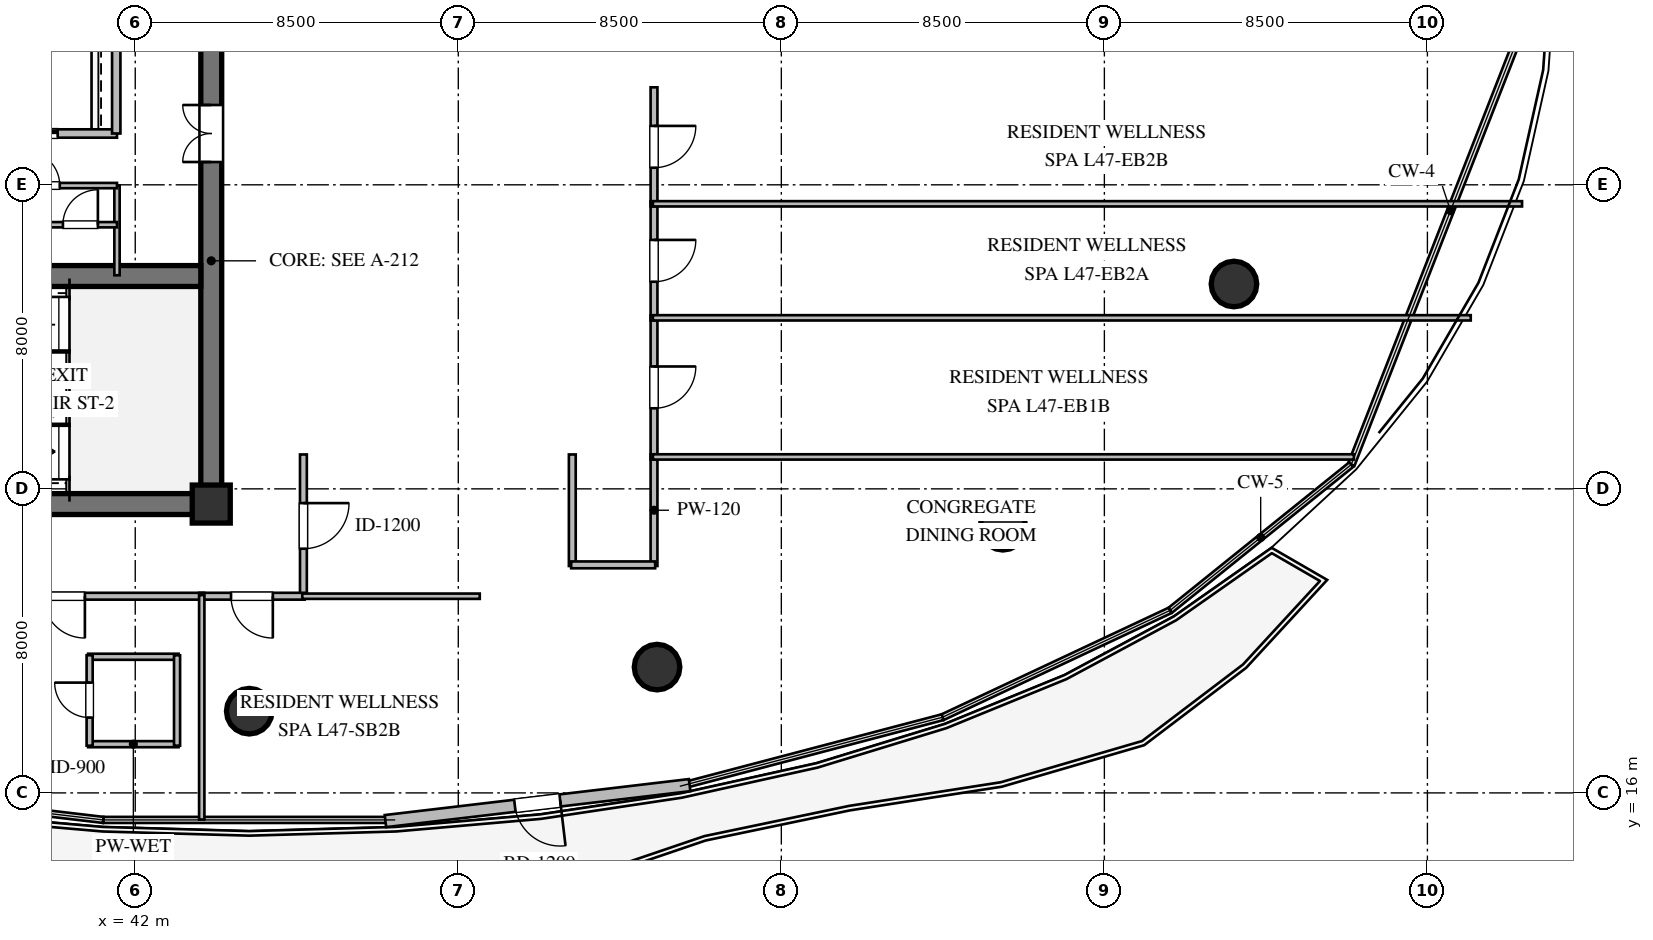
"""IFC4 building model, lengths in metres.
Left out: names, types, materials, properties, quantities, classifications, styles, units other than length and angle.
Written with IfcOpenShell. Run it as: python <this file> out.ifc"""

import sys

from ifc_helpers import new_model, si_unit, direction, frame, frame_2d, origin, origin_2d, place, context, subcontext, project, spatial, rectangle, circle, extrude, element, fill, save


model = new_model("IFC4")
c1 = context("Model", 3, precision=1e-05, world=origin(), true_north=direction((0.0, 1.0)))
c2 = subcontext(c1, "Body", "Model", "MODEL_VIEW")
j1 = project(units=[si_unit("LENGTHUNIT", "METRE"), si_unit("PLANEANGLEUNIT", "RADIAN")], contexts=[c1])
p1 = place(None, origin())
s1 = spatial("IfcSite", under=j1, at=p1, CompositionType="ELEMENT")
p2 = place(p1, origin())
s2 = spatial("IfcBuilding", under=s1, at=p2, CompositionType="ELEMENT")
p3 = place(p2, frame((0.0, 0.0, 178.2)))
s3 = spatial("IfcBuildingStorey", under=s2, at=p3, CompositionType="ELEMENT", Elevation=178.2)
p4 = place(p3, frame((21.725, 23.6, 0.0), z_axis=(0.0, 0.0, 1.0), x_axis=(1.0, 0.0, 0.0)))
e1 = element("IfcWall", 1, at=p4, inside=s3, PredefinedType="SHEAR", context=c2, shape_type="SweptSolid", body=[
    extrude(rectangle(XDim=22.55, YDim=0.55, at=frame_2d((11.275, 0.0))), origin(), (0.0, 0.0, 1.0), 3.28),
])
p5 = place(p3, frame((44.0, 23.875, 0.0), z_axis=(0.0, 0.0, 1.0), x_axis=(0.0, 1.0, 0.0)))
e2 = element("IfcWall", 2, at=p5, inside=s3, PredefinedType="SHEAR", context=c2, shape_type="SweptSolid", body=[
    extrude(rectangle(XDim=12.25, YDim=0.55, at=frame_2d((6.125, 0.0))), origin(), (0.0, 0.0, 1.0), 3.28),
])
p6 = place(p5, frame((8.725, 0.0, 0.0)))
e3 = element("IfcOpeningElement", 3, at=p6, cuts=e2, PredefinedType="OPENING", context=c2, shape_type="SweptSolid", body=[
    extrude(rectangle(XDim=1.5, YDim=2.15, at=frame_2d((0.75, 1.075))), frame((0.0, 0.285, 0.0), z_axis=(0.0, -1.0, 0.0), x_axis=(1.0, 0.0, 0.0)), (0.0, 0.0, 1.0), 0.57),
])
p7 = place(p3, frame((22.275, 29.6, 0.0), z_axis=(0.0, 0.0, 1.0), x_axis=(1.0, 0.0, 0.0)))
e4 = element("IfcWall", 4, at=p7, inside=s3, PredefinedType="SHEAR", context=c2, shape_type="SweptSolid", body=[
    extrude(rectangle(XDim=21.45, YDim=0.55, at=frame_2d((10.725, 0.0))), origin(), (0.0, 0.0, 1.0), 3.28),
])
p8 = place(p7, frame((12.175, 0.0, 0.0)))
e5 = element("IfcOpeningElement", 5, at=p8, cuts=e4, PredefinedType="OPENING", context=c2, shape_type="SweptSolid", body=[
    extrude(rectangle(XDim=1.15, YDim=2.1, at=frame_2d((0.575, 1.05))), frame((0.0, 0.285, 0.0), z_axis=(0.0, -1.0, 0.0), x_axis=(1.0, 0.0, 0.0)), (0.0, 0.0, 1.0), 0.57),
])
p9 = place(p3, frame((44.0, 23.6, 0.0), z_axis=(0.0, 0.0, 1.0), x_axis=(1.0, 0.0, 0.0)))
e6 = element("IfcColumn", 6, at=p9, inside=s3, PredefinedType="COLUMN", context=c2, shape_type="SweptSolid", body=[
    extrude(rectangle(XDim=1.0, YDim=1.0, at=origin_2d()), origin(), (0.0, 0.0, 1.0), 3.6),
])
for number, where, z_axis, x_axis in (
    (7, (45.0, 18.15, 0.0), (0.0, 0.0, 1.0), (1.0, 0.0, 0.0)),
    (8, (55.73, 19.31, 0.0), (0.0, 0.0, 1.0), (1.0, 0.0, 0.0)),
    (9, (64.83, 22.99, 0.0), (0.0, 0.0, 1.0), (1.0, 0.0, 0.0)),
    (10, (70.91, 29.39, 0.0), (0.0, 0.0, 1.0), (1.0, 0.0, 0.0)),
):
    element("IfcColumn", number, at=place(p3, frame(where, z_axis=z_axis, x_axis=x_axis)), inside=s3, PredefinedType="COLUMN", context=c2, shape_type="SweptSolid", body=[
        extrude(circle(Radius=0.6, at=origin_2d()), origin(), (0.0, 0.0, 1.0), 3.6),
    ])
p10 = place(p3, frame((56.587, 16.205, 0.0), z_axis=(0.0, 0.0, 1.0), x_axis=(-0.993072847957, -0.117500292131, 0.0)))
e11 = element("IfcWall", 11, at=p10, inside=s3, PredefinedType="STANDARD", context=c2, shape_type="SweptSolid", body=[
    extrude(rectangle(XDim=8.06, YDim=0.32, at=frame_2d((4.03, 0.0))), origin(), (0.0, 0.0, 1.0), 3.28),
])
p11 = place(p10, frame((3.43, 0.0, 0.0)))
e12 = element("IfcOpeningElement", 12, at=p11, cuts=e11, PredefinedType="OPENING", context=c2, shape_type="SweptSolid", body=[
    extrude(rectangle(XDim=1.2, YDim=2.15, at=frame_2d((0.6, 1.075))), frame((0.0, 0.17, 0.0), z_axis=(0.0, -1.0, 0.0), x_axis=(1.0, 0.0, 0.0)), (0.0, 0.0, 1.0), 0.34),
])
p12 = place(p3, frame((33.98, 33.35, 0.0), z_axis=(0.0, 0.0, 1.0), x_axis=(1.0, 0.0, 0.0)))
e13 = element("IfcWall", 13, at=p12, inside=s3, PredefinedType="SOLIDWALL", context=c2, shape_type="SweptSolid", body=[
    extrude(rectangle(XDim=7.54, YDim=0.22, at=frame_2d((3.77, 0.0))), origin(), (0.0, 0.0, 1.0), 3.28),
])
p13 = place(p12, frame((1.335, 0.0, 0.0)))
e14 = element("IfcOpeningElement", 14, at=p13, cuts=e13, PredefinedType="OPENING", context=c2, shape_type="SweptSolid", body=[
    extrude(rectangle(XDim=1.1, YDim=2.1, at=frame_2d((0.55, 1.05))), frame((0.0, 0.12, 0.0), z_axis=(0.0, -1.0, 0.0), x_axis=(1.0, 0.0, 0.0)), (0.0, 0.0, 1.0), 0.24),
])
p14 = place(p12, frame((4.879, 0.0, 0.0)))
e15 = element("IfcOpeningElement", 15, at=p14, cuts=e13, PredefinedType="OPENING", context=c2, shape_type="SweptSolid", body=[
    extrude(rectangle(XDim=1.1, YDim=2.1, at=frame_2d((0.55, 1.05))), frame((0.0, 0.12, 0.0), z_axis=(0.0, -1.0, 0.0), x_axis=(1.0, 0.0, 0.0)), (0.0, 0.0, 1.0), 0.24),
])
p15 = place(p3, frame((41.5, 33.35, 0.0), z_axis=(0.0, 0.0, 1.0), x_axis=(0.0, 1.0, 0.0)))
e16 = element("IfcWall", 16, at=p15, inside=s3, PredefinedType="SOLIDWALL", context=c2, shape_type="SweptSolid", body=[
    extrude(rectangle(XDim=2.75, YDim=0.22, at=frame_2d((1.375, 0.0))), origin(), (0.0, 0.0, 1.0), 3.28),
])
p16 = place(p3, frame((41.52, 29.62, 0.0), z_axis=(0.0, 0.0, 1.0), x_axis=(0.0, 1.0, 0.0)))
e17 = element("IfcWall", 17, at=p16, inside=s3, PredefinedType="PARTITIONING", context=c2, shape_type="SweptSolid", body=[
    extrude(rectangle(XDim=2.36, YDim=0.14, at=frame_2d((1.18, 0.0))), origin(), (0.0, 0.0, 1.0), 3.28),
])
p17 = place(p3, frame((38.48, 30.95, 0.0), z_axis=(0.0, 0.0, 1.0), x_axis=(1.0, 0.0, 0.0)))
e18 = element("IfcWall", 18, at=p17, inside=s3, PredefinedType="PARTITIONING", context=c2, shape_type="SweptSolid", body=[
    extrude(rectangle(XDim=3.04, YDim=0.14, at=frame_2d((1.52, 0.0))), origin(), (0.0, 0.0, 1.0), 3.28),
])
p18 = place(p17, frame((1.617, 0.0, 0.0)))
e19 = element("IfcOpeningElement", 19, at=p18, cuts=e18, PredefinedType="OPENING", context=c2, shape_type="SweptSolid", body=[
    extrude(rectangle(XDim=0.92, YDim=2.1, at=frame_2d((0.46, 1.05))), frame((0.0, 0.08, 0.0), z_axis=(0.0, -1.0, 0.0), x_axis=(1.0, 0.0, 0.0)), (0.0, 0.0, 1.0), 0.16),
])
p19 = place(p3, frame((38.48, 31.98, 0.0), z_axis=(0.0, 0.0, 1.0), x_axis=(1.0, 0.0, 0.0)))
e20 = element("IfcWall", 20, at=p19, inside=s3, PredefinedType="PARTITIONING", context=c2, shape_type="SweptSolid", body=[
    extrude(rectangle(XDim=3.04, YDim=0.14, at=frame_2d((1.52, 0.0))), origin(), (0.0, 0.0, 1.0), 3.28),
])
p20 = place(p19, frame((0.614, 0.0, 0.0)))
e21 = element("IfcOpeningElement", 21, at=p20, cuts=e20, PredefinedType="OPENING", context=c2, shape_type="SweptSolid", body=[
    extrude(rectangle(XDim=0.92, YDim=2.1, at=frame_2d((0.46, 1.05))), frame((0.0, 0.08, 0.0), z_axis=(0.0, -1.0, 0.0), x_axis=(1.0, 0.0, 0.0)), (0.0, 0.0, 1.0), 0.16),
])
for number, where, z_axis, x_axis in (
    (22, (40.76, 17.282, 0.0), (0.0, 0.0, 1.0), (1.0, 0.0, 0.0)),
    (23, (40.76, 19.582, 0.0), (0.0, 0.0, 1.0), (1.0, 0.0, 0.0)),
):
    element("IfcWall", number, at=place(p3, frame(where, z_axis=z_axis, x_axis=x_axis)), inside=s3, PredefinedType="PLUMBINGWALL", context=c2, shape_type="SweptSolid", body=[
        extrude(rectangle(XDim=2.38, YDim=0.16, at=frame_2d((1.19, 0.0))), origin(), (0.0, 0.0, 1.0), 3.28),
    ])
p21 = place(p3, frame((40.8, 17.242, 0.0), z_axis=(0.0, 0.0, 1.0), x_axis=(0.0, 1.0, 0.0)))
e24 = element("IfcWall", 24, at=p21, inside=s3, PredefinedType="PLUMBINGWALL", context=c2, shape_type="SweptSolid", body=[
    extrude(rectangle(XDim=2.38, YDim=0.16, at=frame_2d((1.19, 0.0))), origin(), (0.0, 0.0, 1.0), 3.28),
])
p22 = place(p21, frame((0.74, 0.0, 0.0)))
e25 = element("IfcOpeningElement", 25, at=p22, cuts=e24, PredefinedType="OPENING", context=c2, shape_type="SweptSolid", body=[
    extrude(rectangle(XDim=0.92, YDim=2.1, at=frame_2d((0.46, 1.05))), frame((0.0, 0.09, 0.0), z_axis=(0.0, -1.0, 0.0), x_axis=(1.0, 0.0, 0.0)), (0.0, 0.0, 1.0), 0.18),
])
p23 = place(p3, frame((43.1, 17.242, 0.0), z_axis=(0.0, 0.0, 1.0), x_axis=(0.0, 1.0, 0.0)))
e26 = element("IfcWall", 26, at=p23, inside=s3, PredefinedType="PLUMBINGWALL", context=c2, shape_type="SweptSolid", body=[
    extrude(rectangle(XDim=2.38, YDim=0.16, at=frame_2d((1.19, 0.0))), origin(), (0.0, 0.0, 1.0), 3.28),
])
p24 = place(p3, frame((46.425, 24.905, 0.0), z_axis=(0.0, 0.0, 1.0), x_axis=(0.0, -1.0, 0.0)))
e27 = element("IfcWall", 27, at=p24, inside=s3, PredefinedType="PARTITIONING", context=c2, shape_type="SweptSolid", body=[
    extrude(rectangle(XDim=3.76, YDim=0.18, at=frame_2d((1.88, 0.0))), origin(), (0.0, 0.0, 1.0), 3.28),
])
p25 = place(p24, frame((1.28, 0.0, 0.0)))
e28 = element("IfcOpeningElement", 28, at=p25, cuts=e27, PredefinedType="OPENING", context=c2, shape_type="SweptSolid", body=[
    extrude(rectangle(XDim=1.2, YDim=2.15, at=frame_2d((0.6, 1.075))), frame((0.0, 0.1, 0.0), z_axis=(0.0, -1.0, 0.0), x_axis=(1.0, 0.0, 0.0)), (0.0, 0.0, 1.0), 0.2),
])
for number, where, z_axis, x_axis in (
    (29, (55.65, 24.905, 0.0), (0.0, 0.0, 1.0), (0.0, -1.0, 0.0)),
    (30, (53.5, 21.97, 0.0), (0.0, 0.0, 1.0), (0.0, 1.0, 0.0)),
):
    element("IfcWall", number, at=place(p3, frame(where, z_axis=z_axis, x_axis=x_axis)), inside=s3, PredefinedType="PARTITIONING", context=c2, shape_type="SweptSolid", body=[
        extrude(rectangle(XDim=2.935, YDim=0.18, at=frame_2d((1.468, 0.0))), origin(), (0.0, 0.0, 1.0), 3.28),
    ])
p26 = place(p3, frame((55.68, 22.0, 0.0), z_axis=(0.0, 0.0, 1.0), x_axis=(-1.0, 0.0, 0.0)))
e31 = element("IfcWall", 31, at=p26, inside=s3, PredefinedType="PARTITIONING", context=c2, shape_type="SweptSolid", body=[
    extrude(rectangle(XDim=2.21, YDim=0.18, at=frame_2d((1.105, 0.0))), origin(), (0.0, 0.0, 1.0), 3.28),
])
p27 = place(p3, frame((55.65, 28.565, 0.0), z_axis=(0.0, 0.0, 1.0), x_axis=(0.0, -1.0, 0.0)))
e32 = element("IfcWall", 32, at=p27, inside=s3, PredefinedType="PARTITIONING", context=c2, shape_type="SweptSolid", body=[
    extrude(rectangle(XDim=3.79, YDim=0.18, at=frame_2d((1.895, 0.0))), origin(), (0.0, 0.0, 1.0), 3.28),
])
p28 = place(p27, frame((1.345, 0.0, 0.0)))
e33 = element("IfcOpeningElement", 33, at=p28, cuts=e32, PredefinedType="OPENING", context=c2, shape_type="SweptSolid", body=[
    extrude(rectangle(XDim=1.1, YDim=2.1, at=frame_2d((0.55, 1.05))), frame((0.0, 0.1, 0.0), z_axis=(0.0, -1.0, 0.0), x_axis=(1.0, 0.0, 0.0)), (0.0, 0.0, 1.0), 0.2),
])
p29 = place(p3, frame((55.65, 31.565, 0.0), z_axis=(0.0, 0.0, 1.0), x_axis=(0.0, -1.0, 0.0)))
e34 = element("IfcWall", 34, at=p29, inside=s3, PredefinedType="PARTITIONING", context=c2, shape_type="SweptSolid", body=[
    extrude(rectangle(XDim=3.13, YDim=0.18, at=frame_2d((1.565, 0.0))), origin(), (0.0, 0.0, 1.0), 3.28),
])
p30 = place(p29, frame((1.015, 0.0, 0.0)))
e35 = element("IfcOpeningElement", 35, at=p30, cuts=e34, PredefinedType="OPENING", context=c2, shape_type="SweptSolid", body=[
    extrude(rectangle(XDim=1.1, YDim=2.1, at=frame_2d((0.55, 1.05))), frame((0.0, 0.1, 0.0), z_axis=(0.0, -1.0, 0.0), x_axis=(1.0, 0.0, 0.0)), (0.0, 0.0, 1.0), 0.2),
])
p31 = place(p3, frame((55.65, 34.565, 0.0), z_axis=(0.0, 0.0, 1.0), x_axis=(0.0, -1.0, 0.0)))
e36 = element("IfcWall", 36, at=p31, inside=s3, PredefinedType="PARTITIONING", context=c2, shape_type="SweptSolid", body=[
    extrude(rectangle(XDim=3.13, YDim=0.18, at=frame_2d((1.565, 0.0))), origin(), (0.0, 0.0, 1.0), 3.28),
])
p32 = place(p31, frame((1.015, 0.0, 0.0)))
e37 = element("IfcOpeningElement", 37, at=p32, cuts=e36, PredefinedType="OPENING", context=c2, shape_type="SweptSolid", body=[
    extrude(rectangle(XDim=1.1, YDim=2.1, at=frame_2d((0.55, 1.05))), frame((0.0, 0.1, 0.0), z_axis=(0.0, -1.0, 0.0), x_axis=(1.0, 0.0, 0.0)), (0.0, 0.0, 1.0), 0.2),
])
p33 = place(p3, frame((43.815, 21.175, 0.0), z_axis=(0.0, 0.0, 1.0), x_axis=(-1.0, 0.0, 0.0)))
e38 = element("IfcWall", 38, at=p33, inside=s3, PredefinedType="PARTITIONING", context=c2, shape_type="SweptSolid", body=[
    extrude(rectangle(XDim=7.38, YDim=0.18, at=frame_2d((3.69, 0.0))), origin(), (0.0, 0.0, 1.0), 2.916),
])
p34 = place(p33, frame((3.14, 0.0, 0.0)))
e39 = element("IfcOpeningElement", 39, at=p34, cuts=e38, PredefinedType="OPENING", context=c2, shape_type="SweptSolid", body=[
    extrude(rectangle(XDim=1.1, YDim=2.1, at=frame_2d((0.55, 1.05))), frame((0.0, 0.1, 0.0), z_axis=(0.0, -1.0, 0.0), x_axis=(1.0, 0.0, 0.0)), (0.0, 0.0, 1.0), 0.2),
])
p35 = place(p3, frame((46.455, 21.175, 0.0), z_axis=(0.0, 0.0, 1.0), x_axis=(-1.0, 0.0, 0.0)))
e40 = element("IfcWall", 40, at=p35, inside=s3, PredefinedType="PARTITIONING", context=c2, shape_type="SweptSolid", body=[
    extrude(rectangle(XDim=2.77, YDim=0.18, at=frame_2d((1.385, 0.0))), origin(), (0.0, 0.0, 1.0), 2.916),
])
p36 = place(p35, frame((0.835, 0.0, 0.0)))
e41 = element("IfcOpeningElement", 41, at=p36, cuts=e40, PredefinedType="OPENING", context=c2, shape_type="SweptSolid", body=[
    extrude(rectangle(XDim=1.1, YDim=2.1, at=frame_2d((0.55, 1.05))), frame((0.0, 0.1, 0.0), z_axis=(0.0, -1.0, 0.0), x_axis=(1.0, 0.0, 0.0)), (0.0, 0.0, 1.0), 0.2),
])
p37 = place(p3, frame((55.62, 24.84, 0.0), z_axis=(0.0, 0.0, 1.0), x_axis=(1.0, 0.0, 0.0)))
e42 = element("IfcWall", 42, at=p37, inside=s3, PredefinedType="PARTITIONING", context=c2, shape_type="SweptSolid", body=[
    extrude(rectangle(XDim=18.445, YDim=0.14, at=frame_2d((9.222, 0.0))), origin(), (0.0, 0.0, 1.0), 3.28),
])
p38 = place(p3, frame((51.065, 21.175, 0.0), z_axis=(0.0, 0.0, 1.0), x_axis=(-1.0, 0.0, 0.0)))
e43 = element("IfcWall", 43, at=p38, inside=s3, PredefinedType="PARTITIONING", context=c2, shape_type="SweptSolid", body=[
    extrude(rectangle(XDim=4.67, YDim=0.14, at=frame_2d((2.335, 0.0))), origin(), (0.0, 0.0, 1.0), 2.916),
])
p39 = place(p3, frame((55.62, 28.5, 0.0), z_axis=(0.0, 0.0, 1.0), x_axis=(1.0, 0.0, 0.0)))
e44 = element("IfcWall", 44, at=p39, inside=s3, PredefinedType="PARTITIONING", context=c2, shape_type="SweptSolid", body=[
    extrude(rectangle(XDim=21.52, YDim=0.14, at=frame_2d((10.76, 0.0))), origin(), (0.0, 0.0, 1.0), 2.81),
])
p40 = place(p3, frame((55.62, 31.5, 0.0), z_axis=(0.0, 0.0, 1.0), x_axis=(1.0, 0.0, 0.0)))
e45 = element("IfcWall", 45, at=p40, inside=s3, PredefinedType="PARTITIONING", context=c2, shape_type="SweptSolid", body=[
    extrude(rectangle(XDim=22.87, YDim=0.14, at=frame_2d((11.435, 0.0))), origin(), (0.0, 0.0, 1.0), 3.28),
])
p41 = place(p3, frame((43.75, 21.205, 0.0), z_axis=(0.0, 0.0, 1.0), x_axis=(0.0, -1.0, 0.0)))
e46 = element("IfcWall", 46, at=p41, inside=s3, PredefinedType="PARTITIONING", context=c2, shape_type="SweptSolid", body=[
    extrude(rectangle(XDim=5.906, YDim=0.14, at=frame_2d((2.953, 0.0))), origin(), (0.0, 0.0, 1.0), 3.28),
])
p42 = place(p11, origin())
e47 = element("IfcDoor", 47, at=p42, inside=s3, OperationType="SINGLE_SWING_LEFT", PredefinedType="DOOR", context=c2, shape_type="SweptSolid", body=[
    extrude(rectangle(XDim=1.2, YDim=2.15, at=frame_2d((0.6, 1.075))), frame((0.0, 0.025, 0.0), z_axis=(0.0, -1.0, 0.0), x_axis=(1.0, 0.0, 0.0)), (0.0, 0.0, 1.0), 0.05),
])
fill(e12, e47)
p43 = place(p6, origin())
e48 = element("IfcDoor", 48, at=p43, inside=s3, OperationType="DOUBLE_DOOR_SINGLE_SWING", PredefinedType="DOOR", context=c2, shape_type="SweptSolid", body=[
    extrude(rectangle(XDim=1.5, YDim=2.15, at=frame_2d((0.75, 1.075))), frame((0.0, 0.025, 0.0), z_axis=(0.0, -1.0, 0.0), x_axis=(1.0, 0.0, 0.0)), (0.0, 0.0, 1.0), 0.05),
])
fill(e3, e48)
p44 = place(p14, origin())
e49 = element("IfcDoor", 49, at=p44, inside=s3, OperationType="SLIDING_TO_RIGHT", PredefinedType="DOOR", context=c2, shape_type="SweptSolid", body=[
    extrude(rectangle(XDim=1.1, YDim=2.1, at=frame_2d((0.55, 1.05))), frame((0.0, 0.025, 0.0), z_axis=(0.0, -1.0, 0.0), x_axis=(1.0, 0.0, 0.0)), (0.0, 0.0, 1.0), 0.05),
])
fill(e15, e49)
p45 = place(p20, origin())
e50 = element("IfcDoor", 50, at=p45, inside=s3, OperationType="SINGLE_SWING_LEFT", PredefinedType="DOOR", context=c2, shape_type="SweptSolid", body=[
    extrude(rectangle(XDim=0.92, YDim=2.1, at=frame_2d((0.46, 1.05))), frame((0.0, 0.025, 0.0), z_axis=(0.0, -1.0, 0.0), x_axis=(1.0, 0.0, 0.0)), (0.0, 0.0, 1.0), 0.05),
])
fill(e21, e50)
p46 = place(p18, origin())
e51 = element("IfcDoor", 51, at=p46, inside=s3, OperationType="SINGLE_SWING_RIGHT", PredefinedType="DOOR", context=c2, shape_type="SweptSolid", body=[
    extrude(rectangle(XDim=0.92, YDim=2.1, at=frame_2d((0.46, 1.05))), frame((0.0, 0.025, 0.0), z_axis=(0.0, -1.0, 0.0), x_axis=(1.0, 0.0, 0.0)), (0.0, 0.0, 1.0), 0.05),
])
fill(e19, e51)
p47 = place(p22, origin())
e52 = element("IfcDoor", 52, at=p47, inside=s3, OperationType="SINGLE_SWING_RIGHT", PredefinedType="DOOR", context=c2, shape_type="SweptSolid", body=[
    extrude(rectangle(XDim=0.92, YDim=2.1, at=frame_2d((0.46, 1.05))), frame((0.0, 0.025, 0.0), z_axis=(0.0, -1.0, 0.0), x_axis=(1.0, 0.0, 0.0)), (0.0, 0.0, 1.0), 0.05),
])
fill(e25, e52)
p48 = place(p25, origin())
e53 = element("IfcDoor", 53, at=p48, inside=s3, OperationType="SINGLE_SWING_LEFT", PredefinedType="DOOR", context=c2, shape_type="SweptSolid", body=[
    extrude(rectangle(XDim=1.2, YDim=2.15, at=frame_2d((0.6, 1.075))), frame((0.0, 0.025, 0.0), z_axis=(0.0, -1.0, 0.0), x_axis=(1.0, 0.0, 0.0)), (0.0, 0.0, 1.0), 0.05),
])
fill(e28, e53)
p49 = place(p28, origin())
e54 = element("IfcDoor", 54, at=p49, inside=s3, OperationType="SINGLE_SWING_LEFT", PredefinedType="DOOR", context=c2, shape_type="SweptSolid", body=[
    extrude(rectangle(XDim=1.1, YDim=2.1, at=frame_2d((0.55, 1.05))), frame((0.0, 0.025, 0.0), z_axis=(0.0, -1.0, 0.0), x_axis=(1.0, 0.0, 0.0)), (0.0, 0.0, 1.0), 0.05),
])
fill(e33, e54)
p50 = place(p30, origin())
e55 = element("IfcDoor", 55, at=p50, inside=s3, OperationType="SINGLE_SWING_LEFT", PredefinedType="DOOR", context=c2, shape_type="SweptSolid", body=[
    extrude(rectangle(XDim=1.1, YDim=2.1, at=frame_2d((0.55, 1.05))), frame((0.0, 0.025, 0.0), z_axis=(0.0, -1.0, 0.0), x_axis=(1.0, 0.0, 0.0)), (0.0, 0.0, 1.0), 0.05),
])
fill(e35, e55)
p51 = place(p32, origin())
e56 = element("IfcDoor", 56, at=p51, inside=s3, OperationType="SINGLE_SWING_LEFT", PredefinedType="DOOR", context=c2, shape_type="SweptSolid", body=[
    extrude(rectangle(XDim=1.1, YDim=2.1, at=frame_2d((0.55, 1.05))), frame((0.0, 0.025, 0.0), z_axis=(0.0, -1.0, 0.0), x_axis=(1.0, 0.0, 0.0)), (0.0, 0.0, 1.0), 0.05),
])
fill(e37, e56)
p52 = place(p34, origin())
e57 = element("IfcDoor", 57, at=p52, inside=s3, OperationType="SINGLE_SWING_LEFT", PredefinedType="DOOR", context=c2, shape_type="SweptSolid", body=[
    extrude(rectangle(XDim=1.1, YDim=2.1, at=frame_2d((0.55, 1.05))), frame((0.0, 0.025, 0.0), z_axis=(0.0, -1.0, 0.0), x_axis=(1.0, 0.0, 0.0)), (0.0, 0.0, 1.0), 0.05),
])
fill(e39, e57)
p53 = place(p36, origin())
e58 = element("IfcDoor", 58, at=p53, inside=s3, OperationType="SINGLE_SWING_LEFT", PredefinedType="DOOR", context=c2, shape_type="SweptSolid", body=[
    extrude(rectangle(XDim=1.1, YDim=2.1, at=frame_2d((0.55, 1.05))), frame((0.0, 0.025, 0.0), z_axis=(0.0, -1.0, 0.0), x_axis=(1.0, 0.0, 0.0)), (0.0, 0.0, 1.0), 0.05),
])
fill(e41, e58)
save(model, sys.argv[1])
